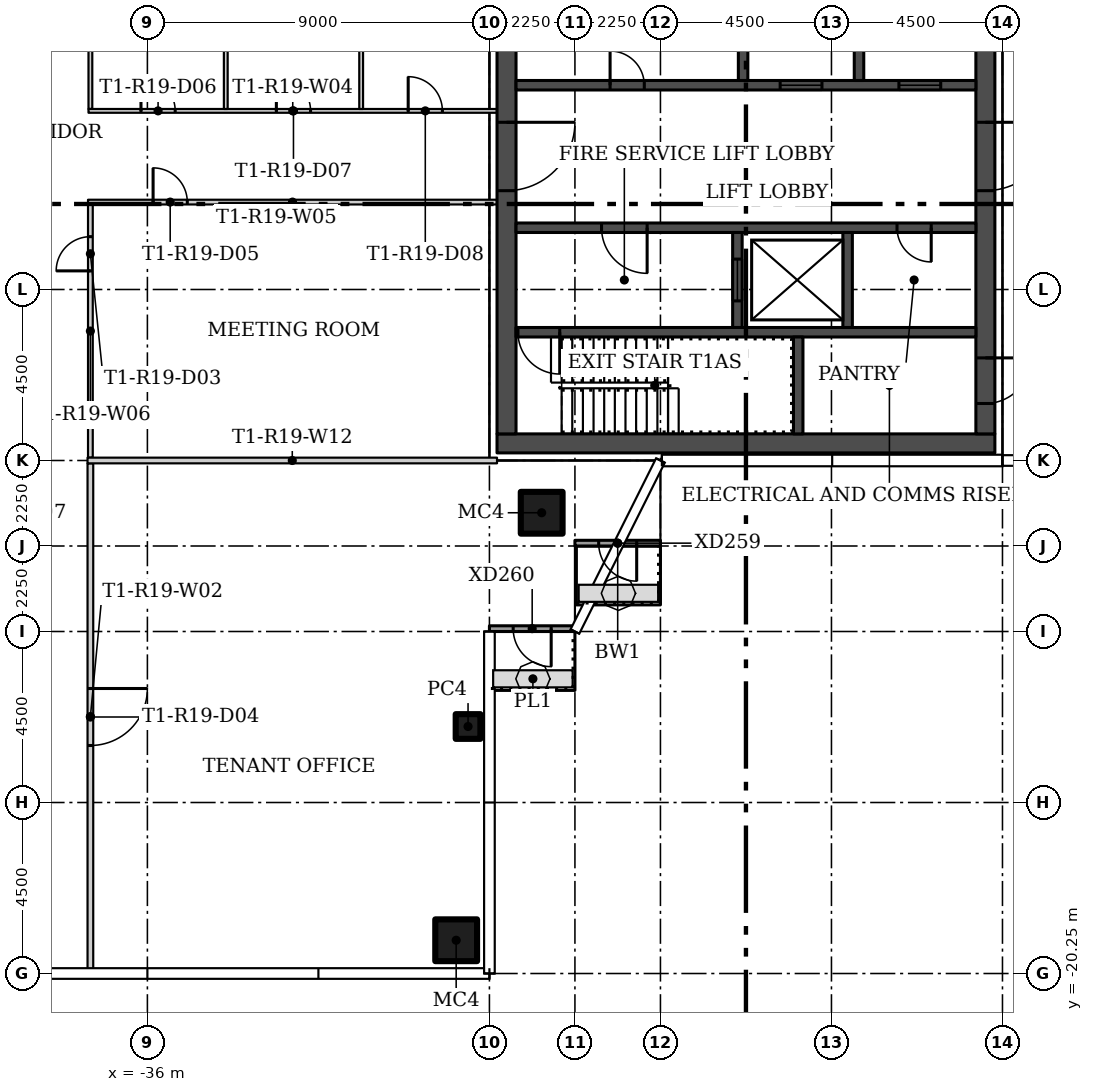
"""IFC4 building model, lengths in metres.
Left out: names, types, materials, properties, quantities, classifications, styles, units other than length and angle.
Written with IfcOpenShell. Run it as: python <this file> out.ifc"""

import sys

from ifc_helpers import new_model, si_unit, direction, frame, frame_2d, origin, origin_2d, place, context, subcontext, project, spatial, rectangle, hollow_rectangle, extrude, element, fill, save


model = new_model("IFC4")
c1 = context("Model", 3, precision=1e-05, world=origin(), true_north=direction((0.0, 1.0)))
c2 = subcontext(c1, "Body", "Model", "MODEL_VIEW")
j1 = project(units=[si_unit("LENGTHUNIT", "METRE"), si_unit("PLANEANGLEUNIT", "RADIAN")], contexts=[c1])
p1 = place(None, origin())
s1 = spatial("IfcSite", under=j1, at=p1, CompositionType="ELEMENT")
p2 = place(p1, origin())
s2 = spatial("IfcBuilding", under=s1, at=p2, CompositionType="ELEMENT")
p3 = place(p2, frame((0.0, 0.0, 174.0)))
s3 = spatial("IfcBuildingStorey", under=s2, at=p3, CompositionType="ELEMENT", Elevation=174.0)
p4 = place(p3, frame((-25.625, -8.125, 0.0)))
e1 = element("IfcColumn", 1, at=p4, inside=s3, PredefinedType="COLUMN", context=c2, shape_type="SweptSolid", body=[
    extrude(hollow_rectangle(XDim=1.1, YDim=1.1, WallThickness=0.04, at=origin_2d()), origin(), (0.0, 0.0, 1.0), 3.45),
])
p5 = place(p3, frame((-27.562, -13.75, 0.0)))
e2 = element("IfcColumn", 2, at=p5, inside=s3, PredefinedType="COLUMN", context=c2, shape_type="SweptSolid", body=[
    extrude(hollow_rectangle(XDim=0.65, YDim=0.65, WallThickness=0.02, at=origin_2d()), origin(), (0.0, 0.0, 1.0), 3.45),
])
p6 = place(p3, frame((-27.875, -19.375, 0.0)))
e3 = element("IfcColumn", 3, at=p6, inside=s3, PredefinedType="COLUMN", context=c2, shape_type="SweptSolid", body=[
    extrude(hollow_rectangle(XDim=1.1, YDim=1.1, WallThickness=0.04, at=origin_2d()), origin(), (0.0, 0.0, 1.0), 3.45),
])
p7 = place(p3, frame((-37.5, -6.825, 0.0), z_axis=(0.0, 0.0, 1.0), x_axis=(0.0, -1.0, 0.0)))
e4 = element("IfcWall", 4, at=p7, inside=s3, PredefinedType="PARTITIONING", context=c2, shape_type="SweptSolid", body=[
    extrude(rectangle(XDim=13.33, YDim=0.15, at=frame_2d((6.665, 0.0))), origin(), (0.0, 0.0, 1.0), 3.45),
])
p8 = place(p7, frame((5.925, 0.0, 0.0)))
e5 = element("IfcOpeningElement", 5, at=p8, cuts=e4, PredefinedType="OPENING", context=c2, shape_type="SweptSolid", body=[
    extrude(rectangle(XDim=1.5, YDim=2.1, at=frame_2d((0.75, 1.05))), frame((0.0, 0.085, 0.0), z_axis=(0.0, -1.0, 0.0), x_axis=(1.0, 0.0, 0.0)), (0.0, 0.0, 1.0), 0.17),
])
p9 = place(p3, frame((-37.5, 6.675, 0.0), z_axis=(0.0, 0.0, 1.0), x_axis=(0.0, -1.0, 0.0)))
e6 = element("IfcWall", 6, at=p9, inside=s3, PredefinedType="PARTITIONING", context=c2, shape_type="SweptSolid", body=[
    extrude(rectangle(XDim=4.175, YDim=0.1, at=frame_2d((2.087, 0.0))), origin(), (0.0, 0.0, 1.0), 3.45),
])
p10 = place(p3, frame((-37.55, 2.45, 0.0)))
e7 = element("IfcWall", 7, at=p10, inside=s3, PredefinedType="PARTITIONING", context=c2, shape_type="SweptSolid", body=[
    extrude(rectangle(XDim=10.75, YDim=0.1, at=frame_2d((5.375, 0.0))), origin(), (0.0, 0.0, 1.0), 3.45),
])
p11 = place(p10, frame((1.381, 0.0, 0.0)))
e8 = element("IfcOpeningElement", 8, at=p11, cuts=e7, PredefinedType="OPENING", context=c2, shape_type="SweptSolid", body=[
    extrude(rectangle(XDim=0.9, YDim=2.1, at=frame_2d((0.45, 1.05))), frame((0.0, 0.06, 0.0), z_axis=(0.0, -1.0, 0.0), x_axis=(1.0, 0.0, 0.0)), (0.0, 0.0, 1.0), 0.12),
])
p12 = place(p10, frame((4.944, 0.0, 0.0)))
e9 = element("IfcOpeningElement", 9, at=p12, cuts=e7, PredefinedType="OPENING", context=c2, shape_type="SweptSolid", body=[
    extrude(rectangle(XDim=0.9, YDim=2.1, at=frame_2d((0.45, 1.05))), frame((0.0, 0.06, 0.0), z_axis=(0.0, -1.0, 0.0), x_axis=(1.0, 0.0, 0.0)), (0.0, 0.0, 1.0), 0.12),
])
p13 = place(p10, frame((8.413, 0.0, 0.0)))
e10 = element("IfcOpeningElement", 10, at=p13, cuts=e7, PredefinedType="OPENING", context=c2, shape_type="SweptSolid", body=[
    extrude(rectangle(XDim=0.9, YDim=2.1, at=frame_2d((0.45, 1.05))), frame((0.0, 0.06, 0.0), z_axis=(0.0, -1.0, 0.0), x_axis=(1.0, 0.0, 0.0)), (0.0, 0.0, 1.0), 0.12),
])
p14 = place(p3, frame((-37.562, 0.05, 0.0)))
e11 = element("IfcWall", 11, at=p14, inside=s3, PredefinedType="PARTITIONING", context=c2, shape_type="SweptSolid", body=[
    extrude(rectangle(XDim=10.762, YDim=0.125, at=frame_2d((5.381, 0.0))), origin(), (0.0, 0.0, 1.0), 3.45),
])
p15 = place(p14, frame((1.712, 0.0, 0.0)))
e12 = element("IfcOpeningElement", 12, at=p15, cuts=e11, PredefinedType="OPENING", context=c2, shape_type="SweptSolid", body=[
    extrude(rectangle(XDim=0.9, YDim=2.1, at=frame_2d((0.45, 1.05))), frame((0.0, 0.073, 0.0), z_axis=(0.0, -1.0, 0.0), x_axis=(1.0, 0.0, 0.0)), (0.0, 0.0, 1.0), 0.145),
])
p16 = place(p3, frame((-37.5, -6.675, 0.0), z_axis=(0.0, 0.0, 1.0), x_axis=(0.0, 1.0, 0.0)))
e13 = element("IfcWall", 13, at=p16, inside=s3, PredefinedType="PARTITIONING", context=c2, shape_type="SweptSolid", body=[
    extrude(rectangle(XDim=6.662, YDim=0.125, at=frame_2d((3.331, 0.0))), origin(), (0.0, 0.0, 1.0), 3.45),
])
p17 = place(p16, frame((4.915, 0.0, 0.0)))
e14 = element("IfcOpeningElement", 14, at=p17, cuts=e13, PredefinedType="OPENING", context=c2, shape_type="SweptSolid", body=[
    extrude(rectangle(XDim=0.9, YDim=2.1, at=frame_2d((0.45, 1.05))), frame((0.0, 0.073, 0.0), z_axis=(0.0, -1.0, 0.0), x_axis=(1.0, 0.0, 0.0)), (0.0, 0.0, 1.0), 0.145),
])
for number, where, z_axis, x_axis in (
    (15, (-33.938, 2.5, 0.0), (0.0, 0.0, 1.0), (0.0, 1.0, 0.0)),
    (16, (-30.375, 2.5, 0.0), (0.0, 0.0, 1.0), (0.0, 1.0, 0.0)),
):
    element("IfcWall", number, at=place(p3, frame(where, z_axis=z_axis, x_axis=x_axis)), inside=s3, PredefinedType="PARTITIONING", context=c2, shape_type="SweptSolid", body=[
        extrude(rectangle(XDim=4.175, YDim=0.1, at=frame_2d((2.087, 0.0))), origin(), (0.0, 0.0, 1.0), 3.45),
    ])
p18 = place(p3, frame((-26.8, -6.75, 0.0), z_axis=(0.0, 0.0, 1.0), x_axis=(-1.0, 0.0, 0.0)))
e17 = element("IfcWall", 17, at=p18, inside=s3, PredefinedType="PARTITIONING", context=c2, shape_type="SweptSolid", body=[
    extrude(rectangle(XDim=10.775, YDim=0.15, at=frame_2d((5.387, 0.0))), origin(), (0.0, 0.0, 1.0), 3.45),
])
p19 = place(p3, frame((-22.5, -8.925, 0.0), z_axis=(0.0, 0.0, 1.0), x_axis=(-1.0, 0.0, 0.0)))
e18 = element("IfcWall", 18, at=p19, inside=s3, PredefinedType="SOLIDWALL", context=c2, shape_type="SweptSolid", body=[
    extrude(rectangle(XDim=2.25, YDim=0.15, at=frame_2d((1.125, 0.0))), origin(), (0.0, 0.0, 1.0), 3.45),
])
p20 = place(p19, frame((0.625, 0.0, 0.0)))
e19 = element("IfcOpeningElement", 19, at=p20, cuts=e18, PredefinedType="OPENING", context=c2, shape_type="SweptSolid", body=[
    extrude(rectangle(XDim=1.0, YDim=2.4, at=frame_2d((0.5, 1.2))), frame((0.0, 0.085, 0.0), z_axis=(0.0, -1.0, 0.0), x_axis=(1.0, 0.0, 0.0)), (0.0, 0.0, 1.0), 0.17),
])
p21 = place(p3, frame((-24.75, -11.175, 0.0), z_axis=(0.0, 0.0, 1.0), x_axis=(-1.0, 0.0, 0.0)))
e20 = element("IfcWall", 20, at=p21, inside=s3, PredefinedType="SOLIDWALL", context=c2, shape_type="SweptSolid", body=[
    extrude(rectangle(XDim=2.25, YDim=0.15, at=frame_2d((1.125, 0.0))), origin(), (0.0, 0.0, 1.0), 3.45),
])
p22 = place(p21, frame((0.625, 0.0, 0.0)))
e21 = element("IfcOpeningElement", 21, at=p22, cuts=e20, PredefinedType="OPENING", context=c2, shape_type="SweptSolid", body=[
    extrude(rectangle(XDim=1.0, YDim=2.4, at=frame_2d((0.5, 1.2))), frame((0.0, 0.085, 0.0), z_axis=(0.0, -1.0, 0.0), x_axis=(1.0, 0.0, 0.0)), (0.0, 0.0, 1.0), 0.17),
])
p23 = place(p3, frame((-26.8, -6.3, 0.0)))
e22 = element("IfcWall", 22, at=p23, inside=s3, PredefinedType="SHEAR", context=c2, shape_type="SweptSolid", body=[
    extrude(rectangle(XDim=13.1, YDim=0.5, at=frame_2d((6.55, 0.0))), origin(), (0.0, 0.0, 1.0), 3.45),
])
p24 = place(p3, frame((-26.55, 6.05, 0.0), z_axis=(0.0, 0.0, 1.0), x_axis=(0.0, -1.0, 0.0)))
e23 = element("IfcWall", 23, at=p24, inside=s3, PredefinedType="SHEAR", context=c2, shape_type="SweptSolid", body=[
    extrude(rectangle(XDim=12.1, YDim=0.5, at=frame_2d((6.05, 0.0))), origin(), (0.0, 0.0, 1.0), 3.45),
])
p25 = place(p24, frame((3.9, 0.0, 0.0)))
e24 = element("IfcOpeningElement", 24, at=p25, cuts=e23, PredefinedType="OPENING", context=c2, shape_type="SweptSolid", body=[
    extrude(rectangle(XDim=1.8, YDim=2.4, at=frame_2d((0.9, 1.2))), frame((0.0, 0.26, 0.0), z_axis=(0.0, -1.0, 0.0), x_axis=(1.0, 0.0, 0.0)), (0.0, 0.0, 1.0), 0.52),
])
p26 = place(p3, frame((-13.95, 6.05, 0.0), z_axis=(0.0, 0.0, 1.0), x_axis=(0.0, -1.0, 0.0)))
e25 = element("IfcWall", 25, at=p26, inside=s3, PredefinedType="SHEAR", context=c2, shape_type="SweptSolid", body=[
    extrude(rectangle(XDim=12.1, YDim=0.5, at=frame_2d((6.05, 0.0))), origin(), (0.0, 0.0, 1.0), 3.45),
])
p27 = place(p26, frame((10.1, 0.0, 0.0)))
e26 = element("IfcOpeningElement", 26, at=p27, cuts=e25, PredefinedType="OPENING", context=c2, shape_type="SweptSolid", body=[
    extrude(rectangle(XDim=1.2, YDim=2.1, at=frame_2d((0.6, 1.05))), frame((0.0, 0.26, 0.0), z_axis=(0.0, -1.0, 0.0), x_axis=(1.0, 0.0, 0.0)), (0.0, 0.0, 1.0), 0.52),
])
p28 = place(p26, frame((3.9, 0.0, 0.0)))
e27 = element("IfcOpeningElement", 27, at=p28, cuts=e25, PredefinedType="OPENING", context=c2, shape_type="SweptSolid", body=[
    extrude(rectangle(XDim=1.8, YDim=2.4, at=frame_2d((0.9, 1.2))), frame((0.0, 0.26, 0.0), z_axis=(0.0, -1.0, 0.0), x_axis=(1.0, 0.0, 0.0)), (0.0, 0.0, 1.0), 0.52),
])
p29 = place(p3, frame((-14.2, -3.375, 0.0), z_axis=(0.0, 0.0, 1.0), x_axis=(-1.0, 0.0, 0.0)))
e28 = element("IfcWall", 28, at=p29, inside=s3, PredefinedType="SHEAR", context=c2, shape_type="SweptSolid", body=[
    extrude(rectangle(XDim=12.1, YDim=0.25, at=frame_2d((6.05, 0.0))), origin(), (0.0, 0.0, 1.0), 3.45),
])
p30 = place(p29, frame((10.95, 0.0, 0.0)))
e29 = element("IfcOpeningElement", 29, at=p30, cuts=e28, PredefinedType="OPENING", context=c2, shape_type="SweptSolid", body=[
    extrude(rectangle(XDim=1.1, YDim=2.1, at=frame_2d((0.55, 1.05))), frame((0.0, 0.135, 0.0), z_axis=(0.0, -1.0, 0.0), x_axis=(1.0, 0.0, 0.0)), (0.0, 0.0, 1.0), 0.27),
])
p31 = place(p3, frame((-18.875, -6.05, 0.0), z_axis=(0.0, 0.0, 1.0), x_axis=(0.0, 1.0, 0.0)))
e30 = element("IfcWall", 30, at=p31, inside=s3, PredefinedType="SHEAR", context=c2, shape_type="SweptSolid", body=[
    extrude(rectangle(XDim=2.55, YDim=0.25, at=frame_2d((1.275, 0.0))), origin(), (0.0, 0.0, 1.0), 3.45),
])
p32 = place(p3, frame((-14.2, -0.625, 0.0), z_axis=(0.0, 0.0, 1.0), x_axis=(-1.0, 0.0, 0.0)))
e31 = element("IfcWall", 31, at=p32, inside=s3, PredefinedType="SHEAR", context=c2, shape_type="SweptSolid", body=[
    extrude(rectangle(XDim=12.1, YDim=0.25, at=frame_2d((6.05, 0.0))), origin(), (0.0, 0.0, 1.0), 3.45),
])
p33 = place(p32, frame((8.65, 0.0, 0.0)))
e32 = element("IfcOpeningElement", 32, at=p33, cuts=e31, PredefinedType="OPENING", context=c2, shape_type="SweptSolid", body=[
    extrude(rectangle(XDim=1.2, YDim=2.1, at=frame_2d((0.6, 1.05))), frame((0.0, 0.135, 0.0), z_axis=(0.0, -1.0, 0.0), x_axis=(1.0, 0.0, 0.0)), (0.0, 0.0, 1.0), 0.27),
])
p34 = place(p32, frame((1.175, 0.0, 0.0)))
e33 = element("IfcOpeningElement", 33, at=p34, cuts=e31, PredefinedType="OPENING", context=c2, shape_type="SweptSolid", body=[
    extrude(rectangle(XDim=0.9, YDim=2.1, at=frame_2d((0.45, 1.05))), frame((0.0, 0.135, 0.0), z_axis=(0.0, -1.0, 0.0), x_axis=(1.0, 0.0, 0.0)), (0.0, 0.0, 1.0), 0.27),
])
p35 = place(p3, frame((-20.475, -3.25, 0.0), z_axis=(0.0, 0.0, 1.0), x_axis=(0.0, 1.0, 0.0)))
e34 = element("IfcWall", 34, at=p35, inside=s3, PredefinedType="SHEAR", context=c2, shape_type="SweptSolid", body=[
    extrude(rectangle(XDim=2.5, YDim=0.25, at=frame_2d((1.25, 0.0))), origin(), (0.0, 0.0, 1.0), 3.45),
])
p36 = place(p35, frame((0.7, 0.0, 0.0)))
e35 = element("IfcOpeningElement", 35, at=p36, cuts=e34, PredefinedType="OPENING", context=c2, shape_type="SweptSolid", body=[
    extrude(rectangle(XDim=1.1, YDim=2.1, at=frame_2d((0.55, 1.05))), frame((0.0, 0.135, 0.0), z_axis=(0.0, -1.0, 0.0), x_axis=(1.0, 0.0, 0.0)), (0.0, 0.0, 1.0), 0.27),
])
p37 = place(p3, frame((-17.575, -3.25, 0.0), z_axis=(0.0, 0.0, 1.0), x_axis=(0.0, 1.0, 0.0)))
e36 = element("IfcWall", 36, at=p37, inside=s3, PredefinedType="SHEAR", context=c2, shape_type="SweptSolid", body=[
    extrude(rectangle(XDim=2.5, YDim=0.25, at=frame_2d((1.25, 0.0))), origin(), (0.0, 0.0, 1.0), 3.45),
])
p38 = place(p3, frame((-26.3, 3.125, 0.0)))
e37 = element("IfcWall", 37, at=p38, inside=s3, PredefinedType="SHEAR", context=c2, shape_type="SweptSolid", body=[
    extrude(rectangle(XDim=12.1, YDim=0.25, at=frame_2d((6.05, 0.0))), origin(), (0.0, 0.0, 1.0), 3.45),
])
p39 = place(p38, frame((6.95, 0.0, 0.0)))
e38 = element("IfcOpeningElement", 38, at=p39, cuts=e37, PredefinedType="OPENING", context=c2, shape_type="SweptSolid", body=[
    extrude(rectangle(XDim=1.1, YDim=2.1, at=frame_2d((0.55, 1.05))), frame((0.0, 0.135, 0.0), z_axis=(0.0, -1.0, 0.0), x_axis=(1.0, 0.0, 0.0)), (0.0, 0.0, 1.0), 0.27),
])
p40 = place(p38, frame((10.075, 0.0, 0.0)))
e39 = element("IfcOpeningElement", 39, at=p40, cuts=e37, PredefinedType="OPENING", context=c2, shape_type="SweptSolid", body=[
    extrude(rectangle(XDim=1.1, YDim=2.1, at=frame_2d((0.55, 1.05))), frame((0.0, 0.135, 0.0), z_axis=(0.0, -1.0, 0.0), x_axis=(1.0, 0.0, 0.0)), (0.0, 0.0, 1.0), 0.27),
])
p41 = place(p38, frame((2.475, 0.0, 0.0)))
e40 = element("IfcOpeningElement", 40, at=p41, cuts=e37, PredefinedType="OPENING", context=c2, shape_type="SweptSolid", body=[
    extrude(rectangle(XDim=0.9, YDim=2.1, at=frame_2d((0.45, 1.05))), frame((0.0, 0.135, 0.0), z_axis=(0.0, -1.0, 0.0), x_axis=(1.0, 0.0, 0.0)), (0.0, 0.0, 1.0), 0.27),
])
for number, where, z_axis, x_axis in (
    (41, (-20.325, 3.25, 0.0), (0.0, 0.0, 1.0), (0.0, 1.0, 0.0)),
    (42, (-17.275, 3.25, 0.0), (0.0, 0.0, 1.0), (0.0, 1.0, 0.0)),
):
    element("IfcWall", number, at=place(p3, frame(where, z_axis=z_axis, x_axis=x_axis)), inside=s3, PredefinedType="SHEAR", context=c2, shape_type="SweptSolid", body=[
        extrude(rectangle(XDim=2.8, YDim=0.25, at=frame_2d((1.4, 0.0))), origin(), (0.0, 0.0, 1.0), 3.45),
    ])
p42 = place(p17, origin())
e43 = element("IfcDoor", 43, at=p42, inside=s3, OperationType="SINGLE_SWING_RIGHT", PredefinedType="DOOR", context=c2, shape_type="SweptSolid", body=[
    extrude(rectangle(XDim=0.9, YDim=2.1, at=frame_2d((0.45, 1.05))), frame((0.0, 0.025, 0.0), z_axis=(0.0, -1.0, 0.0), x_axis=(1.0, 0.0, 0.0)), (0.0, 0.0, 1.0), 0.05),
])
fill(e14, e43)
p43 = place(p8, origin())
e44 = element("IfcDoor", 44, at=p43, inside=s3, OperationType="DOUBLE_DOOR_SINGLE_SWING", PredefinedType="DOOR", context=c2, shape_type="SweptSolid", body=[
    extrude(rectangle(XDim=1.5, YDim=2.1, at=frame_2d((0.75, 1.05))), frame((0.0, 0.025, 0.0), z_axis=(0.0, -1.0, 0.0), x_axis=(1.0, 0.0, 0.0)), (0.0, 0.0, 1.0), 0.05),
])
fill(e5, e44)
p44 = place(p15, origin())
e45 = element("IfcDoor", 45, at=p44, inside=s3, OperationType="SINGLE_SWING_LEFT", PredefinedType="DOOR", context=c2, shape_type="SweptSolid", body=[
    extrude(rectangle(XDim=0.9, YDim=2.1, at=frame_2d((0.45, 1.05))), frame((0.0, 0.025, 0.0), z_axis=(0.0, -1.0, 0.0), x_axis=(1.0, 0.0, 0.0)), (0.0, 0.0, 1.0), 0.05),
])
fill(e12, e45)
p45 = place(p11, origin())
e46 = element("IfcDoor", 46, at=p45, inside=s3, OperationType="SINGLE_SWING_LEFT", PredefinedType="DOOR", context=c2, shape_type="SweptSolid", body=[
    extrude(rectangle(XDim=0.9, YDim=2.1, at=frame_2d((0.45, 1.05))), frame((0.0, 0.025, 0.0), z_axis=(0.0, -1.0, 0.0), x_axis=(1.0, 0.0, 0.0)), (0.0, 0.0, 1.0), 0.05),
])
fill(e8, e46)
p46 = place(p12, origin())
e47 = element("IfcDoor", 47, at=p46, inside=s3, OperationType="SINGLE_SWING_LEFT", PredefinedType="DOOR", context=c2, shape_type="SweptSolid", body=[
    extrude(rectangle(XDim=0.9, YDim=2.1, at=frame_2d((0.45, 1.05))), frame((0.0, 0.025, 0.0), z_axis=(0.0, -1.0, 0.0), x_axis=(1.0, 0.0, 0.0)), (0.0, 0.0, 1.0), 0.05),
])
fill(e9, e47)
p47 = place(p13, origin())
e48 = element("IfcDoor", 48, at=p47, inside=s3, OperationType="SINGLE_SWING_RIGHT", PredefinedType="DOOR", context=c2, shape_type="SweptSolid", body=[
    extrude(rectangle(XDim=0.9, YDim=2.1, at=frame_2d((0.45, 1.05))), frame((0.0, 0.025, 0.0), z_axis=(0.0, -1.0, 0.0), x_axis=(1.0, 0.0, 0.0)), (0.0, 0.0, 1.0), 0.05),
])
fill(e10, e48)
p48 = place(p20, origin())
e49 = element("IfcDoor", 49, at=p48, inside=s3, OperationType="SINGLE_SWING_RIGHT", PredefinedType="DOOR", context=c2, shape_type="SweptSolid", body=[
    extrude(rectangle(XDim=1.0, YDim=2.4, at=frame_2d((0.5, 1.2))), frame((0.0, 0.025, 0.0), z_axis=(0.0, -1.0, 0.0), x_axis=(1.0, 0.0, 0.0)), (0.0, 0.0, 1.0), 0.05),
])
fill(e19, e49)
p49 = place(p22, origin())
e50 = element("IfcDoor", 50, at=p49, inside=s3, OperationType="SINGLE_SWING_LEFT", PredefinedType="DOOR", context=c2, shape_type="SweptSolid", body=[
    extrude(rectangle(XDim=1.0, YDim=2.4, at=frame_2d((0.5, 1.2))), frame((0.0, 0.025, 0.0), z_axis=(0.0, -1.0, 0.0), x_axis=(1.0, 0.0, 0.0)), (0.0, 0.0, 1.0), 0.05),
])
fill(e21, e50)
p50 = place(p25, origin())
e51 = element("IfcDoor", 51, at=p50, inside=s3, OperationType="DOUBLE_DOOR_SINGLE_SWING", PredefinedType="DOOR", context=c2, shape_type="SweptSolid", body=[
    extrude(rectangle(XDim=1.8, YDim=2.4, at=frame_2d((0.9, 1.2))), frame((0.0, 0.025, 0.0), z_axis=(0.0, -1.0, 0.0), x_axis=(1.0, 0.0, 0.0)), (0.0, 0.0, 1.0), 0.05),
])
fill(e24, e51)
p51 = place(p27, origin())
e52 = element("IfcDoor", 52, at=p51, inside=s3, OperationType="SINGLE_SWING_RIGHT", PredefinedType="DOOR", context=c2, shape_type="SweptSolid", body=[
    extrude(rectangle(XDim=1.2, YDim=2.1, at=frame_2d((0.6, 1.05))), frame((0.0, 0.025, 0.0), z_axis=(0.0, -1.0, 0.0), x_axis=(1.0, 0.0, 0.0)), (0.0, 0.0, 1.0), 0.05),
])
fill(e26, e52)
p52 = place(p28, origin())
e53 = element("IfcDoor", 53, at=p52, inside=s3, OperationType="DOUBLE_DOOR_SINGLE_SWING", PredefinedType="DOOR", context=c2, shape_type="SweptSolid", body=[
    extrude(rectangle(XDim=1.8, YDim=2.4, at=frame_2d((0.9, 1.2))), frame((0.0, 0.025, 0.0), z_axis=(0.0, -1.0, 0.0), x_axis=(1.0, 0.0, 0.0)), (0.0, 0.0, 1.0), 0.05),
])
fill(e27, e53)
p53 = place(p30, origin())
e54 = element("IfcDoor", 54, at=p53, inside=s3, OperationType="SINGLE_SWING_RIGHT", PredefinedType="DOOR", context=c2, shape_type="SweptSolid", body=[
    extrude(rectangle(XDim=1.1, YDim=2.1, at=frame_2d((0.55, 1.05))), frame((0.0, 0.025, 0.0), z_axis=(0.0, -1.0, 0.0), x_axis=(1.0, 0.0, 0.0)), (0.0, 0.0, 1.0), 0.05),
])
fill(e29, e54)
p54 = place(p33, origin())
e55 = element("IfcDoor", 55, at=p54, inside=s3, OperationType="SINGLE_SWING_RIGHT", PredefinedType="DOOR", context=c2, shape_type="SweptSolid", body=[
    extrude(rectangle(XDim=1.2, YDim=2.1, at=frame_2d((0.6, 1.05))), frame((0.0, 0.025, 0.0), z_axis=(0.0, -1.0, 0.0), x_axis=(1.0, 0.0, 0.0)), (0.0, 0.0, 1.0), 0.05),
])
fill(e32, e55)
p55 = place(p34, origin())
e56 = element("IfcDoor", 56, at=p55, inside=s3, OperationType="SINGLE_SWING_LEFT", PredefinedType="DOOR", context=c2, shape_type="SweptSolid", body=[
    extrude(rectangle(XDim=0.9, YDim=2.1, at=frame_2d((0.45, 1.05))), frame((0.0, 0.025, 0.0), z_axis=(0.0, -1.0, 0.0), x_axis=(1.0, 0.0, 0.0)), (0.0, 0.0, 1.0), 0.05),
])
fill(e33, e56)
p56 = place(p36, origin())
e57 = element("IfcDoor", 57, at=p56, inside=s3, OperationType="SLIDING_TO_LEFT", PredefinedType="DOOR", context=c2, shape_type="SweptSolid", body=[
    extrude(rectangle(XDim=1.1, YDim=2.1, at=frame_2d((0.55, 1.05))), frame((0.0, 0.025, 0.0), z_axis=(0.0, -1.0, 0.0), x_axis=(1.0, 0.0, 0.0)), (0.0, 0.0, 1.0), 0.05),
])
fill(e35, e57)
p57 = place(p39, origin())
e58 = element("IfcDoor", 58, at=p57, inside=s3, OperationType="SLIDING_TO_LEFT", PredefinedType="DOOR", context=c2, shape_type="SweptSolid", body=[
    extrude(rectangle(XDim=1.1, YDim=2.1, at=frame_2d((0.55, 1.05))), frame((0.0, 0.025, 0.0), z_axis=(0.0, -1.0, 0.0), x_axis=(1.0, 0.0, 0.0)), (0.0, 0.0, 1.0), 0.05),
])
fill(e38, e58)
p58 = place(p40, origin())
e59 = element("IfcDoor", 59, at=p58, inside=s3, OperationType="SLIDING_TO_LEFT", PredefinedType="DOOR", context=c2, shape_type="SweptSolid", body=[
    extrude(rectangle(XDim=1.1, YDim=2.1, at=frame_2d((0.55, 1.05))), frame((0.0, 0.025, 0.0), z_axis=(0.0, -1.0, 0.0), x_axis=(1.0, 0.0, 0.0)), (0.0, 0.0, 1.0), 0.05),
])
fill(e39, e59)
p59 = place(p41, origin())
e60 = element("IfcDoor", 60, at=p59, inside=s3, OperationType="SINGLE_SWING_LEFT", PredefinedType="DOOR", context=c2, shape_type="SweptSolid", body=[
    extrude(rectangle(XDim=0.9, YDim=2.1, at=frame_2d((0.45, 1.05))), frame((0.0, 0.025, 0.0), z_axis=(0.0, -1.0, 0.0), x_axis=(1.0, 0.0, 0.0)), (0.0, 0.0, 1.0), 0.05),
])
fill(e40, e60)
save(model, sys.argv[1])
